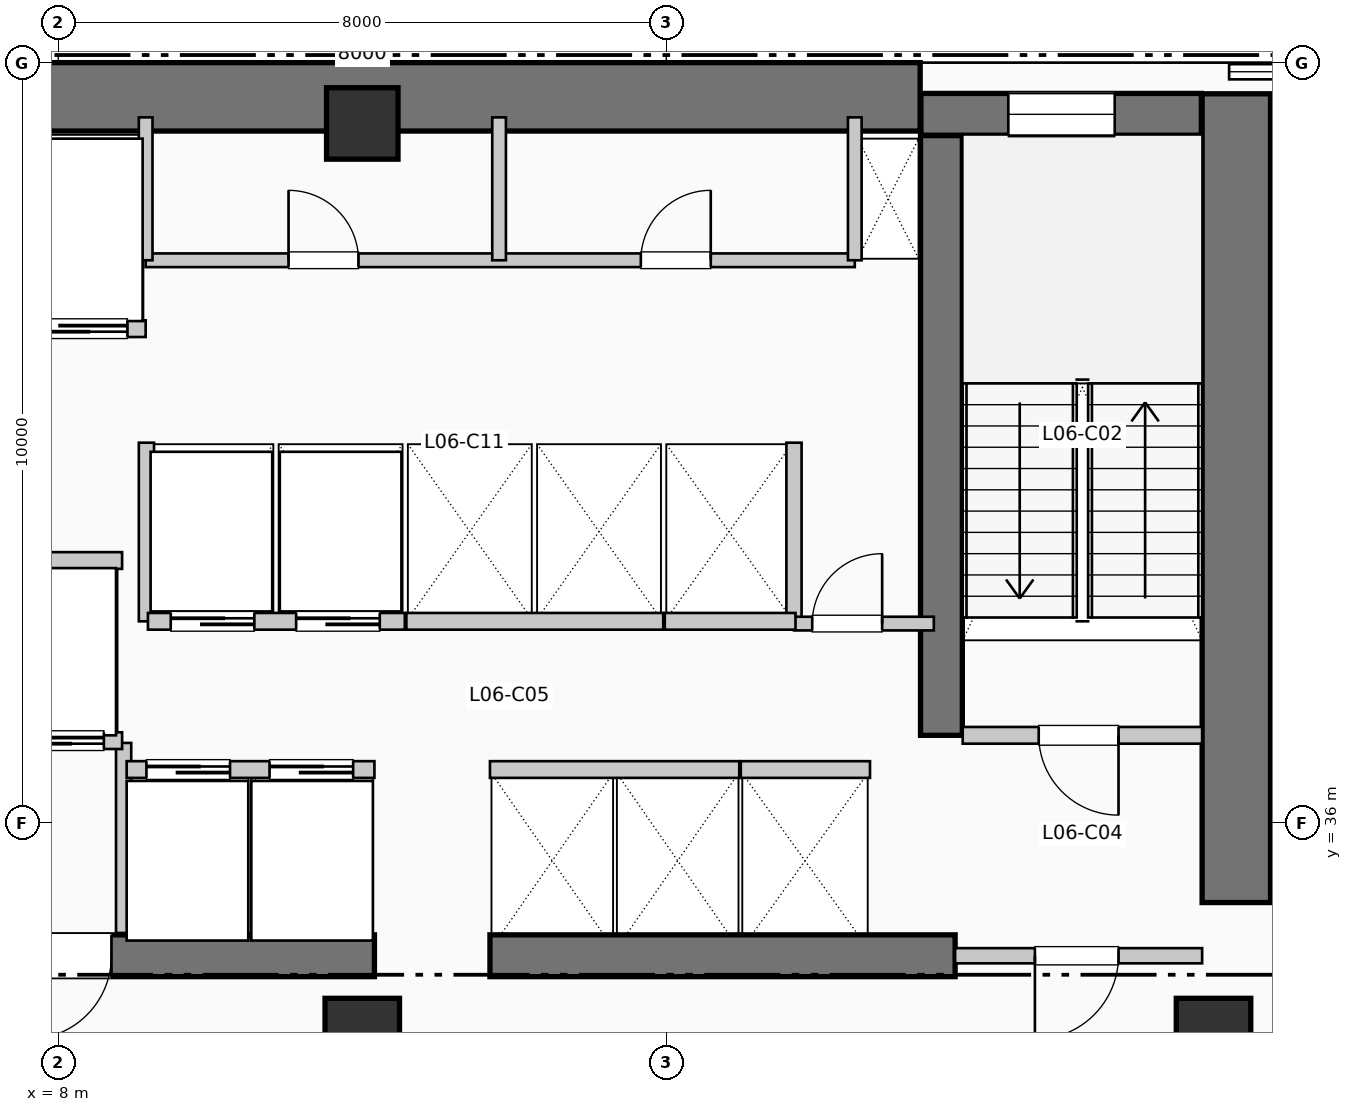
"""IFC4 building model, lengths in metres.
Left out: names, types, materials, properties, quantities, classifications, styles, units other than length and angle.
Written with IfcOpenShell. Run it as: python <this file> out.ifc"""

import sys

from ifc_helpers import new_model, si_unit, direction, frame, frame_2d, origin, origin_2d, place, context, subcontext, project, spatial, rectangle, extrude, element, fill, save


model = new_model("IFC4")
c1 = context("Model", 3, precision=1e-05, world=origin(), true_north=direction((0.0, 1.0)))
c2 = subcontext(c1, "Body", "Model", "MODEL_VIEW")
j1 = project(units=[si_unit("LENGTHUNIT", "METRE"), si_unit("PLANEANGLEUNIT", "RADIAN")], contexts=[c1])
p1 = place(None, origin())
s1 = spatial("IfcSite", under=j1, at=p1, CompositionType="ELEMENT")
p2 = place(p1, origin())
s2 = spatial("IfcBuilding", under=s1, at=p2, CompositionType="ELEMENT")
p3 = place(p2, frame((0.0, 0.0, 30.36)))
s3 = spatial("IfcBuildingStorey", under=s2, at=p3, CompositionType="ELEMENT", Elevation=30.36)
p4 = place(p3, frame((5.36, 45.55, 0.0), z_axis=(0.0, 0.0, 1.0), x_axis=(1.0, 0.0, 0.0)))
e1 = element("IfcWall", 1, at=p4, inside=s3, PredefinedType="SHEAR", context=c2, shape_type="SweptSolid", body=[
    extrude(rectangle(XDim=13.98, YDim=0.9, at=frame_2d((6.99, 0.0))), origin(), (0.0, 0.0, 1.0), 3.96),
])
p5 = place(p3, frame((23.5, 34.95, 0.0), z_axis=(0.0, 0.0, 1.0), x_axis=(0.0, 1.0, 0.0)))
e2 = element("IfcWall", 2, at=p5, inside=s3, PredefinedType="SHEAR", context=c2, shape_type="SweptSolid", body=[
    extrude(rectangle(XDim=10.64, YDim=0.9, at=frame_2d((5.32, 0.0))), origin(), (0.0, 0.0, 1.0), 3.96),
])
p6 = place(p3, frame((1.45, 34.25, 0.0), z_axis=(0.0, 0.0, 1.0), x_axis=(1.0, 0.0, 0.0)))
e3 = element("IfcWall", 3, at=p6, inside=s3, PredefinedType="SHEAR", context=c2, shape_type="SweptSolid", body=[
    extrude(rectangle(XDim=10.71, YDim=0.55, at=frame_2d((5.355, 0.0))), origin(), (0.0, 0.0, 1.0), 3.96),
])
p7 = place(p6, frame((7.25, 0.0, 0.0), z_axis=(0.0, 0.0, 1.0), x_axis=(-1.0, 0.0, 0.0)))
e4 = element("IfcOpeningElement", 4, at=p7, cuts=e3, PredefinedType="OPENING", context=c2, shape_type="SweptSolid", body=[
    extrude(rectangle(XDim=1.1, YDim=2.15, at=frame_2d((0.55, 1.075))), frame((0.0, 0.285, 0.0), z_axis=(0.0, -1.0, 0.0), x_axis=(1.0, 0.0, 0.0)), (0.0, 0.0, 1.0), 0.57),
])
p8 = place(p3, frame((13.68, 34.25, 0.0), z_axis=(0.0, 0.0, 1.0), x_axis=(1.0, 0.0, 0.0)))
e5 = element("IfcWall", 5, at=p8, inside=s3, PredefinedType="SHEAR", context=c2, shape_type="SweptSolid", body=[
    extrude(rectangle(XDim=6.12, YDim=0.55, at=frame_2d((3.06, 0.0))), origin(), (0.0, 0.0, 1.0), 3.96),
])
p9 = place(p3, frame((19.62, 37.15, 0.0), z_axis=(0.0, 0.0, 1.0), x_axis=(0.0, 1.0, 0.0)))
e6 = element("IfcWall", 6, at=p9, inside=s3, PredefinedType="SHEAR", context=c2, shape_type="SweptSolid", body=[
    extrude(rectangle(XDim=7.89, YDim=0.55, at=frame_2d((3.945, 0.0))), origin(), (0.0, 0.0, 1.0), 3.96),
])
p10 = place(p3, frame((19.35, 45.32, 0.0), z_axis=(0.0, 0.0, 1.0), x_axis=(1.0, 0.0, 0.0)))
e7 = element("IfcWall", 7, at=p10, inside=s3, PredefinedType="SHEAR", context=c2, shape_type="SweptSolid", body=[
    extrude(rectangle(XDim=3.69, YDim=0.55, at=frame_2d((1.845, 0.0))), origin(), (0.0, 0.0, 1.0), 3.96),
])
p11 = place(p10, frame((1.15, 0.0, 1.05)))
e8 = element("IfcOpeningElement", 8, at=p11, cuts=e7, PredefinedType="OPENING", context=c2, shape_type="SweptSolid", body=[
    extrude(rectangle(XDim=1.4, YDim=1.8, at=frame_2d((0.7, 0.9))), frame((0.0, 0.285, 0.0), z_axis=(0.0, -1.0, 0.0), x_axis=(1.0, 0.0, 0.0)), (0.0, 0.0, 1.0), 0.57),
])
p12 = place(p3, frame((12.0, 33.2, 0.0), z_axis=(0.0, 0.0, 1.0), x_axis=(1.0, 0.0, 0.0)))
e9 = element("IfcColumn", 9, at=p12, inside=s3, PredefinedType="COLUMN", context=c2, shape_type="SweptSolid", body=[
    extrude(rectangle(XDim=0.98, YDim=0.98, at=origin_2d()), origin(), (0.0, 0.0, 1.0), 3.96),
])
p13 = place(p3, frame((12.0, 45.2, 0.0), z_axis=(0.0, 0.0, 1.0), x_axis=(1.0, 0.0, 0.0)))
e10 = element("IfcColumn", 10, at=p13, inside=s3, PredefinedType="COLUMN", context=c2, shape_type="SweptSolid", body=[
    extrude(rectangle(XDim=0.94, YDim=0.94, at=origin_2d()), origin(), (0.0, 0.0, 1.0), 3.96),
])
p14 = place(p3, frame((23.2, 33.2, 0.0), z_axis=(0.0, 0.0, 1.0), x_axis=(1.0, 0.0, 0.0)))
e11 = element("IfcColumn", 11, at=p14, inside=s3, PredefinedType="COLUMN", context=c2, shape_type="SweptSolid", body=[
    extrude(rectangle(XDim=0.98, YDim=0.98, at=origin_2d()), origin(), (0.0, 0.0, 1.0), 3.96),
])
p15 = place(p3, frame((8.86, 34.55, 0.0), z_axis=(0.0, 0.0, 1.0), x_axis=(0.0, 1.0, 0.0)))
e12 = element("IfcWall", 12, at=p15, inside=s3, PredefinedType="PARTITIONING", context=c2, shape_type="SweptSolid", body=[
    extrude(rectangle(XDim=2.5, YDim=0.2, at=frame_2d((1.25, 0.0))), origin(), (0.0, 0.0, 1.0), 3.71),
])
p16 = place(p3, frame((19.9, 37.15, 0.0), z_axis=(0.0, 0.0, 1.0), x_axis=(1.0, 0.0, 0.0)))
e13 = element("IfcWall", 13, at=p16, inside=s3, PredefinedType="PARTITIONING", context=c2, shape_type="SweptSolid", body=[
    extrude(rectangle(XDim=3.15, YDim=0.22, at=frame_2d((1.575, 0.0))), origin(), (0.0, 0.0, 1.0), 3.71),
])
p17 = place(p16, frame((2.05, 0.0, 0.0), z_axis=(0.0, 0.0, 1.0), x_axis=(-1.0, 0.0, 0.0)))
e14 = element("IfcOpeningElement", 14, at=p17, cuts=e13, PredefinedType="OPENING", context=c2, shape_type="SweptSolid", body=[
    extrude(rectangle(XDim=1.05, YDim=2.15, at=frame_2d((0.525, 1.075))), frame((0.0, 0.12, 0.0), z_axis=(0.0, -1.0, 0.0), x_axis=(1.0, 0.0, 0.0)), (0.0, 0.0, 1.0), 0.24),
])
p18 = place(p3, frame((19.8, 34.25, 0.0), z_axis=(0.0, 0.0, 1.0), x_axis=(1.0, 0.0, 0.0)))
e15 = element("IfcWall", 15, at=p18, inside=s3, PredefinedType="PARTITIONING", context=c2, shape_type="SweptSolid", body=[
    extrude(rectangle(XDim=3.25, YDim=0.2, at=frame_2d((1.625, 0.0))), origin(), (0.0, 0.0, 1.0), 3.71),
])
p19 = place(p18, frame((2.15, 0.0, 0.0), z_axis=(0.0, 0.0, 1.0), x_axis=(-1.0, 0.0, 0.0)))
e16 = element("IfcOpeningElement", 16, at=p19, cuts=e15, PredefinedType="OPENING", context=c2, shape_type="SweptSolid", body=[
    extrude(rectangle(XDim=1.1, YDim=2.15, at=frame_2d((0.55, 1.075))), frame((0.0, 0.11, 0.0), z_axis=(0.0, -1.0, 0.0), x_axis=(1.0, 0.0, 0.0)), (0.0, 0.0, 1.0), 0.22),
])
p20 = place(p3, frame((5.38, 37.08, 0.0), z_axis=(0.0, 0.0, 1.0), x_axis=(1.0, 0.0, 0.0)))
e17 = element("IfcWall", 17, at=p20, inside=s3, PredefinedType="PARTITIONING", context=c2, shape_type="SweptSolid", body=[
    extrude(rectangle(XDim=3.46, YDim=0.22, at=frame_2d((1.73, 0.0))), origin(), (0.0, 0.0, 1.0), 3.71),
])
p21 = place(p20, frame((1.55, 0.0, 0.0), z_axis=(0.0, 0.0, 1.0), x_axis=(-1.0, 0.0, 0.0)))
e18 = element("IfcOpeningElement", 18, at=p21, cuts=e17, PredefinedType="OPENING", context=c2, shape_type="SweptSolid", body=[
    extrude(rectangle(XDim=1.2, YDim=2.2, at=frame_2d((0.6, 1.1))), frame((0.0, 0.12, 0.0), z_axis=(0.0, -1.0, 0.0), x_axis=(1.0, 0.0, 0.0)), (0.0, 0.0, 1.0), 0.24),
])
p22 = place(p20, frame((3.22, 0.0, 0.0), z_axis=(0.0, 0.0, 1.0), x_axis=(-1.0, 0.0, 0.0)))
e19 = element("IfcOpeningElement", 19, at=p22, cuts=e17, PredefinedType="OPENING", context=c2, shape_type="SweptSolid", body=[
    extrude(rectangle(XDim=1.2, YDim=2.2, at=frame_2d((0.6, 1.1))), frame((0.0, 0.12, 0.0), z_axis=(0.0, -1.0, 0.0), x_axis=(1.0, 0.0, 0.0)), (0.0, 0.0, 1.0), 0.24),
])
p23 = place(p3, frame((5.38, 39.45, 0.0), z_axis=(0.0, 0.0, 1.0), x_axis=(1.0, 0.0, 0.0)))
e20 = element("IfcWall", 20, at=p23, inside=s3, PredefinedType="PARTITIONING", context=c2, shape_type="SweptSolid", body=[
    extrude(rectangle(XDim=3.46, YDim=0.22, at=frame_2d((1.73, 0.0))), origin(), (0.0, 0.0, 1.0), 3.71),
])
p24 = place(p3, frame((5.38, 42.5, 0.0), z_axis=(0.0, 0.0, 1.0), x_axis=(1.0, 0.0, 0.0)))
e21 = element("IfcWall", 21, at=p24, inside=s3, PredefinedType="PARTITIONING", context=c2, shape_type="SweptSolid", body=[
    extrude(rectangle(XDim=3.77, YDim=0.22, at=frame_2d((1.885, 0.0))), origin(), (0.0, 0.0, 1.0), 3.71),
])
p25 = place(p24, frame((1.75, 0.0, 0.0), z_axis=(0.0, 0.0, 1.0), x_axis=(-1.0, 0.0, 0.0)))
e22 = element("IfcOpeningElement", 22, at=p25, cuts=e21, PredefinedType="OPENING", context=c2, shape_type="SweptSolid", body=[
    extrude(rectangle(XDim=1.4, YDim=2.2, at=frame_2d((0.7, 1.1))), frame((0.0, 0.12, 0.0), z_axis=(0.0, -1.0, 0.0), x_axis=(1.0, 0.0, 0.0)), (0.0, 0.0, 1.0), 0.24),
])
p26 = place(p24, frame((3.53, 0.0, 0.0), z_axis=(0.0, 0.0, 1.0), x_axis=(-1.0, 0.0, 0.0)))
e23 = element("IfcOpeningElement", 23, at=p26, cuts=e21, PredefinedType="OPENING", context=c2, shape_type="SweptSolid", body=[
    extrude(rectangle(XDim=1.4, YDim=2.2, at=frame_2d((0.7, 1.1))), frame((0.0, 0.12, 0.0), z_axis=(0.0, -1.0, 0.0), x_axis=(1.0, 0.0, 0.0)), (0.0, 0.0, 1.0), 0.24),
])
for number, where, z_axis, x_axis in (
    (24, (9.16, 38.65, 0.0), (0.0, 0.0, 1.0), (0.0, 1.0, 0.0)),
    (25, (17.68, 38.65, 0.0), (0.0, 0.0, 1.0), (0.0, 1.0, 0.0)),
):
    element("IfcWall", number, at=place(p3, frame(where, z_axis=z_axis, x_axis=x_axis)), inside=s3, PredefinedType="PARTITIONING", context=c2, shape_type="SweptSolid", body=[
        extrude(rectangle(XDim=2.35, YDim=0.2, at=frame_2d((1.175, 0.0))), origin(), (0.0, 0.0, 1.0), 3.71),
    ])
p27 = place(p3, frame((17.68, 38.62, 0.0), z_axis=(0.0, 0.0, 1.0), x_axis=(1.0, 0.0, 0.0)))
e26 = element("IfcWall", 26, at=p27, inside=s3, PredefinedType="PARTITIONING", context=c2, shape_type="SweptSolid", body=[
    extrude(rectangle(XDim=1.84, YDim=0.18, at=frame_2d((0.92, 0.0))), origin(), (0.0, 0.0, 1.0), 3.71),
])
p28 = place(p27, frame((0.24, 0.0, 0.0)))
e27 = element("IfcOpeningElement", 27, at=p28, cuts=e26, PredefinedType="OPENING", context=c2, shape_type="SweptSolid", body=[
    extrude(rectangle(XDim=0.92, YDim=2.1, at=frame_2d((0.46, 1.05))), frame((0.0, 0.1, 0.0), z_axis=(0.0, -1.0, 0.0), x_axis=(1.0, 0.0, 0.0)), (0.0, 0.0, 1.0), 0.2),
])
p29 = place(p3, frame((8.9, 36.7, 0.0), z_axis=(0.0, 0.0, 1.0), x_axis=(1.0, 0.0, 0.0)))
e28 = element("IfcWall", 28, at=p29, inside=s3, PredefinedType="PARTITIONING", context=c2, shape_type="SweptSolid", body=[
    extrude(rectangle(XDim=3.26, YDim=0.22, at=frame_2d((1.63, 0.0))), origin(), (0.0, 0.0, 1.0), 3.71),
])
p30 = place(p29, frame((0.26, 0.0, 0.0)))
e29 = element("IfcOpeningElement", 29, at=p30, cuts=e28, PredefinedType="OPENING", context=c2, shape_type="SweptSolid", body=[
    extrude(rectangle(XDim=1.1, YDim=2.2, at=frame_2d((0.55, 1.1))), frame((0.0, 0.12, 0.0), z_axis=(0.0, -1.0, 0.0), x_axis=(1.0, 0.0, 0.0)), (0.0, 0.0, 1.0), 0.24),
])
p31 = place(p29, frame((1.88, 0.0, 0.0)))
e30 = element("IfcOpeningElement", 30, at=p31, cuts=e28, PredefinedType="OPENING", context=c2, shape_type="SweptSolid", body=[
    extrude(rectangle(XDim=1.1, YDim=2.2, at=frame_2d((0.55, 1.1))), frame((0.0, 0.12, 0.0), z_axis=(0.0, -1.0, 0.0), x_axis=(1.0, 0.0, 0.0)), (0.0, 0.0, 1.0), 0.24),
])
p32 = place(p3, frame((9.18, 38.65, 0.0), z_axis=(0.0, 0.0, 1.0), x_axis=(1.0, 0.0, 0.0)))
e31 = element("IfcWall", 31, at=p32, inside=s3, PredefinedType="PARTITIONING", context=c2, shape_type="SweptSolid", body=[
    extrude(rectangle(XDim=3.38, YDim=0.22, at=frame_2d((1.69, 0.0))), origin(), (0.0, 0.0, 1.0), 3.71),
])
p33 = place(p32, frame((0.3, 0.0, 0.0)))
e32 = element("IfcOpeningElement", 32, at=p33, cuts=e31, PredefinedType="OPENING", context=c2, shape_type="SweptSolid", body=[
    extrude(rectangle(XDim=1.1, YDim=2.2, at=frame_2d((0.55, 1.1))), frame((0.0, 0.12, 0.0), z_axis=(0.0, -1.0, 0.0), x_axis=(1.0, 0.0, 0.0)), (0.0, 0.0, 1.0), 0.24),
])
p34 = place(p32, frame((1.95, 0.0, 0.0)))
e33 = element("IfcOpeningElement", 33, at=p34, cuts=e31, PredefinedType="OPENING", context=c2, shape_type="SweptSolid", body=[
    extrude(rectangle(XDim=1.1, YDim=2.2, at=frame_2d((0.55, 1.1))), frame((0.0, 0.12, 0.0), z_axis=(0.0, -1.0, 0.0), x_axis=(1.0, 0.0, 0.0)), (0.0, 0.0, 1.0), 0.24),
])
p35 = place(p3, frame((13.68, 36.7, 0.0), z_axis=(0.0, 0.0, 1.0), x_axis=(1.0, 0.0, 0.0)))
e34 = element("IfcWall", 34, at=p35, inside=s3, PredefinedType="PARTITIONING", context=c2, shape_type="SweptSolid", body=[
    extrude(rectangle(XDim=3.28, YDim=0.22, at=frame_2d((1.64, 0.0))), origin(), (0.0, 0.0, 1.0), 3.71),
])
p36 = place(p3, frame((12.58, 38.65, 0.0), z_axis=(0.0, 0.0, 1.0), x_axis=(1.0, 0.0, 0.0)))
e35 = element("IfcWall", 35, at=p36, inside=s3, PredefinedType="PARTITIONING", context=c2, shape_type="SweptSolid", body=[
    extrude(rectangle(XDim=3.38, YDim=0.22, at=frame_2d((1.69, 0.0))), origin(), (0.0, 0.0, 1.0), 3.71),
])
p37 = place(p3, frame((16.98, 36.7, 0.0), z_axis=(0.0, 0.0, 1.0), x_axis=(1.0, 0.0, 0.0)))
e36 = element("IfcWall", 36, at=p37, inside=s3, PredefinedType="PARTITIONING", context=c2, shape_type="SweptSolid", body=[
    extrude(rectangle(XDim=1.7, YDim=0.22, at=frame_2d((0.85, 0.0))), origin(), (0.0, 0.0, 1.0), 3.71),
])
p38 = place(p3, frame((15.98, 38.65, 0.0), z_axis=(0.0, 0.0, 1.0), x_axis=(1.0, 0.0, 0.0)))
e37 = element("IfcWall", 37, at=p38, inside=s3, PredefinedType="PARTITIONING", context=c2, shape_type="SweptSolid", body=[
    extrude(rectangle(XDim=1.72, YDim=0.22, at=frame_2d((0.86, 0.0))), origin(), (0.0, 0.0, 1.0), 3.71),
])
p39 = place(p3, frame((9.15, 43.4, 0.0), z_axis=(0.0, 0.0, 1.0), x_axis=(1.0, 0.0, 0.0)))
e38 = element("IfcWall", 38, at=p39, inside=s3, PredefinedType="PLUMBINGWALL", context=c2, shape_type="SweptSolid", body=[
    extrude(rectangle(XDim=9.33, YDim=0.18, at=frame_2d((4.665, 0.0))), origin(), (0.0, 0.0, 1.0), 3.71),
])
p40 = place(p39, frame((1.88, 0.0, 0.0)))
e39 = element("IfcOpeningElement", 39, at=p40, cuts=e38, PredefinedType="OPENING", context=c2, shape_type="SweptSolid", body=[
    extrude(rectangle(XDim=0.92, YDim=2.1, at=frame_2d((0.46, 1.05))), frame((0.0, 0.1, 0.0), z_axis=(0.0, -1.0, 0.0), x_axis=(1.0, 0.0, 0.0)), (0.0, 0.0, 1.0), 0.2),
])
p41 = place(p39, frame((6.515, 0.0, 0.0)))
e40 = element("IfcOpeningElement", 40, at=p41, cuts=e38, PredefinedType="OPENING", context=c2, shape_type="SweptSolid", body=[
    extrude(rectangle(XDim=0.92, YDim=2.1, at=frame_2d((0.46, 1.05))), frame((0.0, 0.1, 0.0), z_axis=(0.0, -1.0, 0.0), x_axis=(1.0, 0.0, 0.0)), (0.0, 0.0, 1.0), 0.2),
])
for number, where, z_axis, x_axis in (
    (41, (9.15, 43.4, 0.0), (0.0, 0.0, 1.0), (0.0, 1.0, 0.0)),
    (42, (18.48, 43.4, 0.0), (0.0, 0.0, 1.0), (0.0, 1.0, 0.0)),
    (43, (13.8, 43.4, 0.0), (0.0, 0.0, 1.0), (0.0, 1.0, 0.0)),
):
    element("IfcWall", number, at=place(p3, frame(where, z_axis=z_axis, x_axis=x_axis)), inside=s3, PredefinedType="PLUMBINGWALL", context=c2, shape_type="SweptSolid", body=[
        extrude(rectangle(XDim=1.88, YDim=0.18, at=frame_2d((0.94, 0.0))), origin(), (0.0, 0.0, 1.0), 3.71),
    ])
p42 = place(p11, origin())
e44 = element("IfcWindow", 44, at=p42, inside=s3, PartitioningType="SINGLE_PANEL", PredefinedType="WINDOW", context=c2, shape_type="SweptSolid", body=[
    extrude(rectangle(XDim=1.4, YDim=1.8, at=frame_2d((0.7, 0.9))), frame((0.0, 0.03, 0.0), z_axis=(0.0, -1.0, 0.0), x_axis=(1.0, 0.0, 0.0)), (0.0, 0.0, 1.0), 0.06),
])
fill(e8, e44)
p43 = place(p7, origin())
e45 = element("IfcDoor", 45, at=p43, inside=s3, OperationType="SINGLE_SWING_LEFT", PredefinedType="DOOR", context=c2, shape_type="SweptSolid", body=[
    extrude(rectangle(XDim=1.1, YDim=2.15, at=frame_2d((0.55, 1.075))), frame((0.0, 0.025, 0.0), z_axis=(0.0, -1.0, 0.0), x_axis=(1.0, 0.0, 0.0)), (0.0, 0.0, 1.0), 0.05),
])
fill(e4, e45)
p44 = place(p17, origin())
e46 = element("IfcDoor", 46, at=p44, inside=s3, OperationType="SINGLE_SWING_RIGHT", PredefinedType="DOOR", context=c2, shape_type="SweptSolid", body=[
    extrude(rectangle(XDim=1.05, YDim=2.15, at=frame_2d((0.525, 1.075))), frame((0.0, 0.025, 0.0), z_axis=(0.0, -1.0, 0.0), x_axis=(1.0, 0.0, 0.0)), (0.0, 0.0, 1.0), 0.05),
])
fill(e14, e46)
p45 = place(p19, origin())
e47 = element("IfcDoor", 47, at=p45, inside=s3, OperationType="SINGLE_SWING_LEFT", PredefinedType="DOOR", context=c2, shape_type="SweptSolid", body=[
    extrude(rectangle(XDim=1.1, YDim=2.15, at=frame_2d((0.55, 1.075))), frame((0.0, 0.025, 0.0), z_axis=(0.0, -1.0, 0.0), x_axis=(1.0, 0.0, 0.0)), (0.0, 0.0, 1.0), 0.05),
])
fill(e16, e47)
p46 = place(p22, origin())
e48 = element("IfcDoor", 48, at=p46, inside=s3, OperationType="SLIDING_TO_RIGHT", PredefinedType="DOOR", context=c2, shape_type="SweptSolid", body=[
    extrude(rectangle(XDim=1.2, YDim=2.2, at=frame_2d((0.6, 1.1))), frame((0.0, 0.025, 0.0), z_axis=(0.0, -1.0, 0.0), x_axis=(1.0, 0.0, 0.0)), (0.0, 0.0, 1.0), 0.05),
])
fill(e19, e48)
p47 = place(p26, origin())
e49 = element("IfcDoor", 49, at=p47, inside=s3, OperationType="SLIDING_TO_LEFT", PredefinedType="DOOR", context=c2, shape_type="SweptSolid", body=[
    extrude(rectangle(XDim=1.4, YDim=2.2, at=frame_2d((0.7, 1.1))), frame((0.0, 0.025, 0.0), z_axis=(0.0, -1.0, 0.0), x_axis=(1.0, 0.0, 0.0)), (0.0, 0.0, 1.0), 0.05),
])
fill(e23, e49)
p48 = place(p28, origin())
e50 = element("IfcDoor", 50, at=p48, inside=s3, OperationType="SINGLE_SWING_RIGHT", PredefinedType="DOOR", context=c2, shape_type="SweptSolid", body=[
    extrude(rectangle(XDim=0.92, YDim=2.1, at=frame_2d((0.46, 1.05))), frame((0.0, 0.025, 0.0), z_axis=(0.0, -1.0, 0.0), x_axis=(1.0, 0.0, 0.0)), (0.0, 0.0, 1.0), 0.05),
])
fill(e27, e50)
p49 = place(p30, origin())
e51 = element("IfcDoor", 51, at=p49, inside=s3, OperationType="SLIDING_TO_LEFT", PredefinedType="DOOR", context=c2, shape_type="SweptSolid", body=[
    extrude(rectangle(XDim=1.1, YDim=2.2, at=frame_2d((0.55, 1.1))), frame((0.0, 0.025, 0.0), z_axis=(0.0, -1.0, 0.0), x_axis=(1.0, 0.0, 0.0)), (0.0, 0.0, 1.0), 0.05),
])
fill(e29, e51)
p50 = place(p31, origin())
e52 = element("IfcDoor", 52, at=p50, inside=s3, OperationType="SLIDING_TO_LEFT", PredefinedType="DOOR", context=c2, shape_type="SweptSolid", body=[
    extrude(rectangle(XDim=1.1, YDim=2.2, at=frame_2d((0.55, 1.1))), frame((0.0, 0.025, 0.0), z_axis=(0.0, -1.0, 0.0), x_axis=(1.0, 0.0, 0.0)), (0.0, 0.0, 1.0), 0.05),
])
fill(e30, e52)
p51 = place(p33, origin())
e53 = element("IfcDoor", 53, at=p51, inside=s3, OperationType="SLIDING_TO_LEFT", PredefinedType="DOOR", context=c2, shape_type="SweptSolid", body=[
    extrude(rectangle(XDim=1.1, YDim=2.2, at=frame_2d((0.55, 1.1))), frame((0.0, 0.025, 0.0), z_axis=(0.0, -1.0, 0.0), x_axis=(1.0, 0.0, 0.0)), (0.0, 0.0, 1.0), 0.05),
])
fill(e32, e53)
p52 = place(p34, origin())
e54 = element("IfcDoor", 54, at=p52, inside=s3, OperationType="SLIDING_TO_LEFT", PredefinedType="DOOR", context=c2, shape_type="SweptSolid", body=[
    extrude(rectangle(XDim=1.1, YDim=2.2, at=frame_2d((0.55, 1.1))), frame((0.0, 0.025, 0.0), z_axis=(0.0, -1.0, 0.0), x_axis=(1.0, 0.0, 0.0)), (0.0, 0.0, 1.0), 0.05),
])
fill(e33, e54)
p53 = place(p40, origin())
e55 = element("IfcDoor", 55, at=p53, inside=s3, OperationType="SINGLE_SWING_LEFT", PredefinedType="DOOR", context=c2, shape_type="SweptSolid", body=[
    extrude(rectangle(XDim=0.92, YDim=2.1, at=frame_2d((0.46, 1.05))), frame((0.0, 0.025, 0.0), z_axis=(0.0, -1.0, 0.0), x_axis=(1.0, 0.0, 0.0)), (0.0, 0.0, 1.0), 0.05),
])
fill(e39, e55)
p54 = place(p41, origin())
e56 = element("IfcDoor", 56, at=p54, inside=s3, OperationType="SINGLE_SWING_RIGHT", PredefinedType="DOOR", context=c2, shape_type="SweptSolid", body=[
    extrude(rectangle(XDim=0.92, YDim=2.1, at=frame_2d((0.46, 1.05))), frame((0.0, 0.025, 0.0), z_axis=(0.0, -1.0, 0.0), x_axis=(1.0, 0.0, 0.0)), (0.0, 0.0, 1.0), 0.05),
])
fill(e40, e56)
save(model, sys.argv[1])
